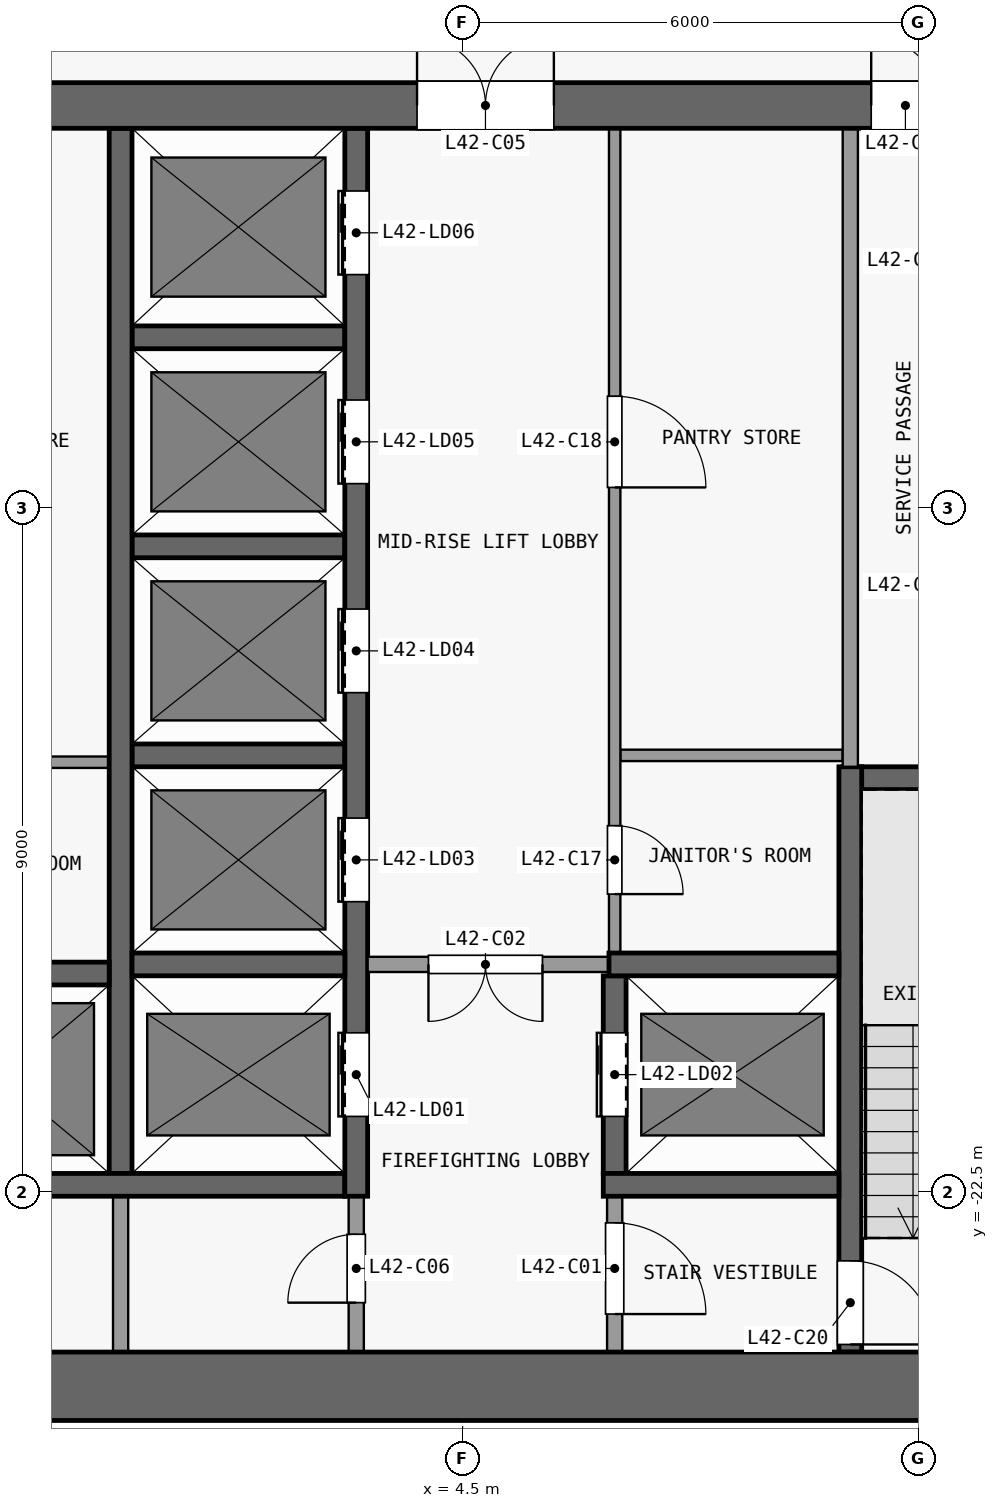
"""IFC4 building model, lengths in metres.
Left out: names, types, materials, properties, quantities, classifications, styles, units other than length and angle.
Written with IfcOpenShell. Run it as: python <this file> out.ifc"""

import sys

from ifc_helpers import new_model, si_unit, direction, frame, frame_2d, origin, place, context, subcontext, project, spatial, rectangle, extrude, element, fill, save


model = new_model("IFC4")
c1 = context("Model", 3, precision=1e-05, world=origin(), true_north=direction((0.0, 1.0)))
c2 = subcontext(c1, "Body", "Model", "MODEL_VIEW")
j1 = project(units=[si_unit("LENGTHUNIT", "METRE"), si_unit("PLANEANGLEUNIT", "RADIAN")], contexts=[c1])
p1 = place(None, origin())
s1 = spatial("IfcSite", under=j1, at=p1, CompositionType="ELEMENT")
p2 = place(p1, origin())
s2 = spatial("IfcBuilding", under=s1, at=p2, CompositionType="ELEMENT")
p3 = place(p2, frame((0.0, 0.0, 170.9)))
s3 = spatial("IfcBuildingStorey", under=s2, at=p3, CompositionType="ELEMENT", Elevation=170.9)
p4 = place(p3, frame((-13.3, -25.05, 0.0), z_axis=(0.0, 0.0, 1.0), x_axis=(1.0, 0.0, 0.0)))
e1 = element("IfcWall", 1, at=p4, inside=s3, PredefinedType="SHEAR", context=c2, shape_type="SweptSolid", body=[
    extrude(rectangle(XDim=26.6, YDim=0.9, at=frame_2d((13.3, 0.0))), origin(), (0.0, 0.0, 1.0), 3.3),
])
p5 = place(p3, frame((-13.3, -8.2, 0.0), z_axis=(0.0, 0.0, 1.0), x_axis=(1.0, 0.0, 0.0)))
e2 = element("IfcWall", 2, at=p5, inside=s3, PredefinedType="SHEAR", context=c2, shape_type="SweptSolid", body=[
    extrude(rectangle(XDim=26.6, YDim=0.6, at=frame_2d((13.3, 0.0))), origin(), (0.0, 0.0, 1.0), 3.3),
])
p6 = place(p5, frame((7.6, 0.0, 0.0)))
e3 = element("IfcOpeningElement", 3, at=p6, cuts=e2, PredefinedType="OPENING", context=c2, shape_type="SweptSolid", body=[
    extrude(rectangle(XDim=1.8, YDim=2.1, at=frame_2d((0.9, 1.05))), frame((0.0, 0.31, 0.0), z_axis=(0.0, -1.0, 0.0), x_axis=(1.0, 0.0, 0.0)), (0.0, 0.0, 1.0), 0.62),
])
p7 = place(p5, frame((17.2, 0.0, 0.0)))
e4 = element("IfcOpeningElement", 4, at=p7, cuts=e2, PredefinedType="OPENING", context=c2, shape_type="SweptSolid", body=[
    extrude(rectangle(XDim=1.8, YDim=2.1, at=frame_2d((0.9, 1.05))), frame((0.0, 0.31, 0.0), z_axis=(0.0, -1.0, 0.0), x_axis=(1.0, 0.0, 0.0)), (0.0, 0.0, 1.0), 0.62),
])
p8 = place(p5, frame((2.525, 0.0, 0.0)))
e5 = element("IfcOpeningElement", 5, at=p8, cuts=e2, PredefinedType="OPENING", context=c2, shape_type="SweptSolid", body=[
    extrude(rectangle(XDim=0.9, YDim=2.1, at=frame_2d((0.45, 1.05))), frame((0.0, 0.31, 0.0), z_axis=(0.0, -1.0, 0.0), x_axis=(1.0, 0.0, 0.0)), (0.0, 0.0, 1.0), 0.62),
])
p9 = place(p5, frame((23.175, 0.0, 0.0)))
e6 = element("IfcOpeningElement", 6, at=p9, cuts=e2, PredefinedType="OPENING", context=c2, shape_type="SweptSolid", body=[
    extrude(rectangle(XDim=0.9, YDim=2.1, at=frame_2d((0.45, 1.05))), frame((0.0, 0.31, 0.0), z_axis=(0.0, -1.0, 0.0), x_axis=(1.0, 0.0, 0.0)), (0.0, 0.0, 1.0), 0.62),
])
p10 = place(p3, frame((-3.25, -22.4, 0.0), z_axis=(0.0, 0.0, 1.0), x_axis=(1.0, 0.0, 0.0)))
e7 = element("IfcWall", 7, at=p10, inside=s3, PredefinedType="SHEAR", context=c2, shape_type="SweptSolid", body=[
    extrude(rectangle(XDim=6.2, YDim=0.3, at=frame_2d((3.1, 0.0))), origin(), (0.0, 0.0, 1.0), 3.3),
])
p11 = place(p3, frame((6.35, -22.4, 0.0), z_axis=(0.0, 0.0, 1.0), x_axis=(1.0, 0.0, 0.0)))
e8 = element("IfcWall", 8, at=p11, inside=s3, PredefinedType="SHEAR", context=c2, shape_type="SweptSolid", body=[
    extrude(rectangle(XDim=3.1, YDim=0.3, at=frame_2d((1.55, 0.0))), origin(), (0.0, 0.0, 1.0), 3.3),
])
p12 = place(p3, frame((-3.175, -19.62, 0.0), z_axis=(0.0, 0.0, 1.0), x_axis=(1.0, 0.0, 0.0)))
e9 = element("IfcWall", 9, at=p12, inside=s3, PredefinedType="SHEAR", context=c2, shape_type="SweptSolid", body=[
    extrude(rectangle(XDim=3.025, YDim=0.3, at=frame_2d((1.513, 0.0))), origin(), (0.0, 0.0, 1.0), 3.3),
])
p13 = place(p3, frame((0.15, -19.5, 0.0), z_axis=(0.0, 0.0, 1.0), x_axis=(1.0, 0.0, 0.0)))
e10 = element("IfcWall", 10, at=p13, inside=s3, PredefinedType="SHEAR", context=c2, shape_type="SweptSolid", body=[
    extrude(rectangle(XDim=2.8, YDim=0.3, at=frame_2d((1.4, 0.0))), origin(), (0.0, 0.0, 1.0), 3.3),
])
p14 = place(p3, frame((6.575, -19.5, 0.0), z_axis=(0.0, 0.0, 1.0), x_axis=(-1.0, 0.0, 0.0)))
e11 = element("IfcWall", 11, at=p14, inside=s3, PredefinedType="PARTITIONING", context=c2, shape_type="SweptSolid", body=[
    extrude(rectangle(XDim=3.325, YDim=0.2, at=frame_2d((1.663, 0.0))), origin(), (0.0, 0.0, 1.0), 3.3),
])
p15 = place(p14, frame((1.025, 0.0, 0.0)))
e12 = element("IfcOpeningElement", 12, at=p15, cuts=e11, PredefinedType="OPENING", context=c2, shape_type="SweptSolid", body=[
    extrude(rectangle(XDim=1.5, YDim=2.1, at=frame_2d((0.75, 1.05))), frame((0.0, 0.11, 0.0), z_axis=(0.0, -1.0, 0.0), x_axis=(1.0, 0.0, 0.0)), (0.0, 0.0, 1.0), 0.22),
])
p16 = place(p3, frame((6.425, -19.5, 0.0), z_axis=(0.0, 0.0, 1.0), x_axis=(1.0, 0.0, 0.0)))
e13 = element("IfcWall", 13, at=p16, inside=s3, PredefinedType="SHEAR", context=c2, shape_type="SweptSolid", body=[
    extrude(rectangle(XDim=3.025, YDim=0.3, at=frame_2d((1.512, 0.0))), origin(), (0.0, 0.0, 1.0), 3.3),
])
p17 = place(p3, frame((9.5, -17.05, 0.0), z_axis=(0.0, 0.0, 1.0), x_axis=(1.0, 0.0, 0.0)))
e14 = element("IfcWall", 14, at=p17, inside=s3, PredefinedType="SHEAR", context=c2, shape_type="SweptSolid", body=[
    extrude(rectangle(XDim=3.1, YDim=0.3, at=frame_2d((1.55, 0.0))), origin(), (0.0, 0.0, 1.0), 3.3),
])
p18 = place(p3, frame((-3.025, -16.84, 0.0), z_axis=(0.0, 0.0, 1.0), x_axis=(1.0, 0.0, 0.0)))
e15 = element("IfcWall", 15, at=p18, inside=s3, PredefinedType="PARTITIONING", context=c2, shape_type="SweptSolid", body=[
    extrude(rectangle(XDim=2.875, YDim=0.15, at=frame_2d((1.438, 0.0))), origin(), (0.0, 0.0, 1.0), 3.3),
])
p19 = place(p3, frame((0.15, -16.75, 0.0), z_axis=(0.0, 0.0, 1.0), x_axis=(1.0, 0.0, 0.0)))
e16 = element("IfcWall", 16, at=p19, inside=s3, PredefinedType="SHEAR", context=c2, shape_type="SweptSolid", body=[
    extrude(rectangle(XDim=2.8, YDim=0.3, at=frame_2d((1.4, 0.0))), origin(), (0.0, 0.0, 1.0), 3.3),
])
p20 = place(p3, frame((6.575, -16.75, 0.0), z_axis=(0.0, 0.0, 1.0), x_axis=(1.0, 0.0, 0.0)))
e17 = element("IfcWall", 17, at=p20, inside=s3, PredefinedType="PARTITIONING", context=c2, shape_type="SweptSolid", body=[
    extrude(rectangle(XDim=2.925, YDim=0.15, at=frame_2d((1.462, 0.0))), origin(), (0.0, 0.0, 1.0), 3.3),
])
for number, where, z_axis, x_axis in (
    (18, (0.15, -14.0, 0.0), (0.0, 0.0, 1.0), (1.0, 0.0, 0.0)),
    (19, (0.15, -11.25, 0.0), (0.0, 0.0, 1.0), (1.0, 0.0, 0.0)),
):
    element("IfcWall", number, at=place(p3, frame(where, z_axis=z_axis, x_axis=x_axis)), inside=s3, PredefinedType="SHEAR", context=c2, shape_type="SweptSolid", body=[
        extrude(rectangle(XDim=2.8, YDim=0.3, at=frame_2d((1.4, 0.0))), origin(), (0.0, 0.0, 1.0), 3.3),
    ])
p21 = place(p3, frame((0.0, -24.6, 0.0), z_axis=(0.0, 0.0, 1.0), x_axis=(0.0, 1.0, 0.0)))
e20 = element("IfcWall", 20, at=p21, inside=s3, PredefinedType="PARTITIONING", context=c2, shape_type="SweptSolid", body=[
    extrude(rectangle(XDim=2.05, YDim=0.2, at=frame_2d((1.025, 0.0))), origin(), (0.0, 0.0, 1.0), 3.3),
])
p22 = place(p3, frame((0.0, -22.25, 0.0), z_axis=(0.0, 0.0, 1.0), x_axis=(0.0, 1.0, 0.0)))
e21 = element("IfcWall", 21, at=p22, inside=s3, PredefinedType="SHEAR", context=c2, shape_type="SweptSolid", body=[
    extrude(rectangle(XDim=13.75, YDim=0.3, at=frame_2d((6.875, 0.0))), origin(), (0.0, 0.0, 1.0), 3.3),
])
p23 = place(p3, frame((3.1, -24.6, 0.0), z_axis=(0.0, 0.0, 1.0), x_axis=(0.0, 1.0, 0.0)))
e22 = element("IfcWall", 22, at=p23, inside=s3, PredefinedType="PARTITIONING", context=c2, shape_type="SweptSolid", body=[
    extrude(rectangle(XDim=2.05, YDim=0.2, at=frame_2d((1.025, 0.0))), origin(), (0.0, 0.0, 1.0), 3.3),
])
p24 = place(p23, frame((0.65, 0.0, 0.0)))
e23 = element("IfcOpeningElement", 23, at=p24, cuts=e22, PredefinedType="OPENING", context=c2, shape_type="SweptSolid", body=[
    extrude(rectangle(XDim=0.9, YDim=2.1, at=frame_2d((0.45, 1.05))), frame((0.0, 0.11, 0.0), z_axis=(0.0, -1.0, 0.0), x_axis=(1.0, 0.0, 0.0)), (0.0, 0.0, 1.0), 0.22),
])
p25 = place(p3, frame((3.1, -22.55, 0.0), z_axis=(0.0, 0.0, 1.0), x_axis=(0.0, 1.0, 0.0)))
e24 = element("IfcWall", 24, at=p25, inside=s3, PredefinedType="SHEAR", context=c2, shape_type="SweptSolid", body=[
    extrude(rectangle(XDim=14.05, YDim=0.3, at=frame_2d((7.025, 0.0))), origin(), (0.0, 0.0, 1.0), 3.3),
])
p26 = place(p25, frame((1.05, 0.0, 0.0)))
e25 = element("IfcOpeningElement", 25, at=p26, cuts=e24, PredefinedType="OPENING", context=c2, shape_type="SweptSolid", body=[
    extrude(rectangle(XDim=1.1, YDim=2.1, at=frame_2d((0.55, 1.05))), frame((0.0, 0.16, 0.0), z_axis=(0.0, -1.0, 0.0), x_axis=(1.0, 0.0, 0.0)), (0.0, 0.0, 1.0), 0.32),
])
p27 = place(p25, frame((3.875, 0.0, 0.0)))
e26 = element("IfcOpeningElement", 26, at=p27, cuts=e24, PredefinedType="OPENING", context=c2, shape_type="SweptSolid", body=[
    extrude(rectangle(XDim=1.1, YDim=2.1, at=frame_2d((0.55, 1.05))), frame((0.0, 0.16, 0.0), z_axis=(0.0, -1.0, 0.0), x_axis=(1.0, 0.0, 0.0)), (0.0, 0.0, 1.0), 0.32),
])
p28 = place(p25, frame((6.625, 0.0, 0.0)))
e27 = element("IfcOpeningElement", 27, at=p28, cuts=e24, PredefinedType="OPENING", context=c2, shape_type="SweptSolid", body=[
    extrude(rectangle(XDim=1.1, YDim=2.1, at=frame_2d((0.55, 1.05))), frame((0.0, 0.16, 0.0), z_axis=(0.0, -1.0, 0.0), x_axis=(1.0, 0.0, 0.0)), (0.0, 0.0, 1.0), 0.32),
])
p29 = place(p25, frame((9.375, 0.0, 0.0)))
e28 = element("IfcOpeningElement", 28, at=p29, cuts=e24, PredefinedType="OPENING", context=c2, shape_type="SweptSolid", body=[
    extrude(rectangle(XDim=1.1, YDim=2.1, at=frame_2d((0.55, 1.05))), frame((0.0, 0.16, 0.0), z_axis=(0.0, -1.0, 0.0), x_axis=(1.0, 0.0, 0.0)), (0.0, 0.0, 1.0), 0.32),
])
p30 = place(p25, frame((12.125, 0.0, 0.0)))
e29 = element("IfcOpeningElement", 29, at=p30, cuts=e24, PredefinedType="OPENING", context=c2, shape_type="SweptSolid", body=[
    extrude(rectangle(XDim=1.1, YDim=2.1, at=frame_2d((0.55, 1.05))), frame((0.0, 0.16, 0.0), z_axis=(0.0, -1.0, 0.0), x_axis=(1.0, 0.0, 0.0)), (0.0, 0.0, 1.0), 0.32),
])
p31 = place(p3, frame((6.5, -22.55, 0.0), z_axis=(0.0, 0.0, 1.0), x_axis=(0.0, -1.0, 0.0)))
e30 = element("IfcWall", 30, at=p31, inside=s3, PredefinedType="PARTITIONING", context=c2, shape_type="SweptSolid", body=[
    extrude(rectangle(XDim=2.05, YDim=0.2, at=frame_2d((1.025, 0.0))), origin(), (0.0, 0.0, 1.0), 3.3),
])
p32 = place(p31, frame((0.35, 0.0, 0.0)))
e31 = element("IfcOpeningElement", 31, at=p32, cuts=e30, PredefinedType="OPENING", context=c2, shape_type="SweptSolid", body=[
    extrude(rectangle(XDim=1.2, YDim=2.1, at=frame_2d((0.6, 1.05))), frame((0.0, 0.11, 0.0), z_axis=(0.0, -1.0, 0.0), x_axis=(1.0, 0.0, 0.0)), (0.0, 0.0, 1.0), 0.22),
])
p33 = place(p3, frame((6.5, -22.25, 0.0), z_axis=(0.0, 0.0, 1.0), x_axis=(0.0, 1.0, 0.0)))
e32 = element("IfcWall", 32, at=p33, inside=s3, PredefinedType="SHEAR", context=c2, shape_type="SweptSolid", body=[
    extrude(rectangle(XDim=2.6, YDim=0.3, at=frame_2d((1.3, 0.0))), origin(), (0.0, 0.0, 1.0), 3.3),
])
p34 = place(p33, frame((0.75, 0.0, 0.0)))
e33 = element("IfcOpeningElement", 33, at=p34, cuts=e32, PredefinedType="OPENING", context=c2, shape_type="SweptSolid", body=[
    extrude(rectangle(XDim=1.1, YDim=2.1, at=frame_2d((0.55, 1.05))), frame((0.0, 0.16, 0.0), z_axis=(0.0, -1.0, 0.0), x_axis=(1.0, 0.0, 0.0)), (0.0, 0.0, 1.0), 0.32),
])
p35 = place(p3, frame((6.5, -8.5, 0.0), z_axis=(0.0, 0.0, 1.0), x_axis=(0.0, -1.0, 0.0)))
e34 = element("IfcWall", 34, at=p35, inside=s3, PredefinedType="PARTITIONING", context=c2, shape_type="SweptSolid", body=[
    extrude(rectangle(XDim=10.85, YDim=0.15, at=frame_2d((5.425, 0.0))), origin(), (0.0, 0.0, 1.0), 3.3),
])
p36 = place(p35, frame((9.175, 0.0, 0.0)))
e35 = element("IfcOpeningElement", 35, at=p36, cuts=e34, PredefinedType="OPENING", context=c2, shape_type="SweptSolid", body=[
    extrude(rectangle(XDim=0.9, YDim=2.1, at=frame_2d((0.45, 1.05))), frame((0.0, 0.085, 0.0), z_axis=(0.0, -1.0, 0.0), x_axis=(1.0, 0.0, 0.0)), (0.0, 0.0, 1.0), 0.17),
])
p37 = place(p35, frame((3.525, 0.0, 0.0)))
e36 = element("IfcOpeningElement", 36, at=p37, cuts=e34, PredefinedType="OPENING", context=c2, shape_type="SweptSolid", body=[
    extrude(rectangle(XDim=1.2, YDim=2.1, at=frame_2d((0.6, 1.05))), frame((0.0, 0.085, 0.0), z_axis=(0.0, -1.0, 0.0), x_axis=(1.0, 0.0, 0.0)), (0.0, 0.0, 1.0), 0.17),
])
p38 = place(p3, frame((9.6, -16.9, 0.0), z_axis=(0.0, 0.0, 1.0), x_axis=(0.0, -1.0, 0.0)))
e37 = element("IfcWall", 37, at=p38, inside=s3, PredefinedType="SHEAR", context=c2, shape_type="SweptSolid", body=[
    extrude(rectangle(XDim=7.7, YDim=0.3, at=frame_2d((3.85, 0.0))), origin(), (0.0, 0.0, 1.0), 3.3),
])
p39 = place(p38, frame((6.5, 0.0, 0.0)))
e38 = element("IfcOpeningElement", 38, at=p39, cuts=e37, PredefinedType="OPENING", context=c2, shape_type="SweptSolid", body=[
    extrude(rectangle(XDim=1.1, YDim=2.1, at=frame_2d((0.55, 1.05))), frame((0.0, 0.16, 0.0), z_axis=(0.0, -1.0, 0.0), x_axis=(1.0, 0.0, 0.0)), (0.0, 0.0, 1.0), 0.32),
])
p40 = place(p3, frame((9.6, -16.9, 0.0), z_axis=(0.0, 0.0, 1.0), x_axis=(0.0, 1.0, 0.0)))
e39 = element("IfcWall", 39, at=p40, inside=s3, PredefinedType="PARTITIONING", context=c2, shape_type="SweptSolid", body=[
    extrude(rectangle(XDim=8.4, YDim=0.2, at=frame_2d((4.2, 0.0))), origin(), (0.0, 0.0, 1.0), 3.3),
])
p41 = place(p26, origin())
e40 = element("IfcDoor", 40, at=p41, inside=s3, OperationType="DOUBLE_DOOR_SLIDING", PredefinedType="DOOR", context=c2, shape_type="SweptSolid", body=[
    extrude(rectangle(XDim=1.1, YDim=2.1, at=frame_2d((0.55, 1.05))), frame((0.0, 0.025, 0.0), z_axis=(0.0, -1.0, 0.0), x_axis=(1.0, 0.0, 0.0)), (0.0, 0.0, 1.0), 0.05),
])
fill(e25, e40)
p42 = place(p34, origin())
e41 = element("IfcDoor", 41, at=p42, inside=s3, OperationType="DOUBLE_DOOR_SLIDING", PredefinedType="DOOR", context=c2, shape_type="SweptSolid", body=[
    extrude(rectangle(XDim=1.1, YDim=2.1, at=frame_2d((0.55, 1.05))), frame((0.0, 0.025, 0.0), z_axis=(0.0, -1.0, 0.0), x_axis=(1.0, 0.0, 0.0)), (0.0, 0.0, 1.0), 0.05),
])
fill(e33, e41)
p43 = place(p27, origin())
e42 = element("IfcDoor", 42, at=p43, inside=s3, OperationType="DOUBLE_DOOR_SLIDING", PredefinedType="DOOR", context=c2, shape_type="SweptSolid", body=[
    extrude(rectangle(XDim=1.1, YDim=2.1, at=frame_2d((0.55, 1.05))), frame((0.0, 0.025, 0.0), z_axis=(0.0, -1.0, 0.0), x_axis=(1.0, 0.0, 0.0)), (0.0, 0.0, 1.0), 0.05),
])
fill(e26, e42)
p44 = place(p28, origin())
e43 = element("IfcDoor", 43, at=p44, inside=s3, OperationType="DOUBLE_DOOR_SLIDING", PredefinedType="DOOR", context=c2, shape_type="SweptSolid", body=[
    extrude(rectangle(XDim=1.1, YDim=2.1, at=frame_2d((0.55, 1.05))), frame((0.0, 0.025, 0.0), z_axis=(0.0, -1.0, 0.0), x_axis=(1.0, 0.0, 0.0)), (0.0, 0.0, 1.0), 0.05),
])
fill(e27, e43)
p45 = place(p29, origin())
e44 = element("IfcDoor", 44, at=p45, inside=s3, OperationType="DOUBLE_DOOR_SLIDING", PredefinedType="DOOR", context=c2, shape_type="SweptSolid", body=[
    extrude(rectangle(XDim=1.1, YDim=2.1, at=frame_2d((0.55, 1.05))), frame((0.0, 0.025, 0.0), z_axis=(0.0, -1.0, 0.0), x_axis=(1.0, 0.0, 0.0)), (0.0, 0.0, 1.0), 0.05),
])
fill(e28, e44)
p46 = place(p30, origin())
e45 = element("IfcDoor", 45, at=p46, inside=s3, OperationType="DOUBLE_DOOR_SLIDING", PredefinedType="DOOR", context=c2, shape_type="SweptSolid", body=[
    extrude(rectangle(XDim=1.1, YDim=2.1, at=frame_2d((0.55, 1.05))), frame((0.0, 0.025, 0.0), z_axis=(0.0, -1.0, 0.0), x_axis=(1.0, 0.0, 0.0)), (0.0, 0.0, 1.0), 0.05),
])
fill(e29, e45)
p47 = place(p32, origin())
e46 = element("IfcDoor", 46, at=p47, inside=s3, OperationType="SINGLE_SWING_RIGHT", PredefinedType="DOOR", context=c2, shape_type="SweptSolid", body=[
    extrude(rectangle(XDim=1.2, YDim=2.1, at=frame_2d((0.6, 1.05))), frame((0.0, 0.025, 0.0), z_axis=(0.0, -1.0, 0.0), x_axis=(1.0, 0.0, 0.0)), (0.0, 0.0, 1.0), 0.05),
])
fill(e31, e46)
p48 = place(p15, origin())
e47 = element("IfcDoor", 47, at=p48, inside=s3, OperationType="DOUBLE_DOOR_SINGLE_SWING", PredefinedType="DOOR", context=c2, shape_type="SweptSolid", body=[
    extrude(rectangle(XDim=1.5, YDim=2.1, at=frame_2d((0.75, 1.05))), frame((0.0, 0.025, 0.0), z_axis=(0.0, -1.0, 0.0), x_axis=(1.0, 0.0, 0.0)), (0.0, 0.0, 1.0), 0.05),
])
fill(e12, e47)
p49 = place(p7, origin())
e48 = element("IfcDoor", 48, at=p49, inside=s3, OperationType="DOUBLE_DOOR_SINGLE_SWING", PredefinedType="DOOR", context=c2, shape_type="SweptSolid", body=[
    extrude(rectangle(XDim=1.8, YDim=2.1, at=frame_2d((0.9, 1.05))), frame((0.0, 0.025, 0.0), z_axis=(0.0, -1.0, 0.0), x_axis=(1.0, 0.0, 0.0)), (0.0, 0.0, 1.0), 0.05),
])
fill(e4, e48)
p50 = place(p24, origin())
e49 = element("IfcDoor", 49, at=p50, inside=s3, OperationType="SINGLE_SWING_LEFT", PredefinedType="DOOR", context=c2, shape_type="SweptSolid", body=[
    extrude(rectangle(XDim=0.9, YDim=2.1, at=frame_2d((0.45, 1.05))), frame((0.0, 0.025, 0.0), z_axis=(0.0, -1.0, 0.0), x_axis=(1.0, 0.0, 0.0)), (0.0, 0.0, 1.0), 0.05),
])
fill(e23, e49)
p51 = place(p9, origin())
e50 = element("IfcDoor", 50, at=p51, inside=s3, OperationType="SINGLE_SWING_LEFT", PredefinedType="DOOR", context=c2, shape_type="SweptSolid", body=[
    extrude(rectangle(XDim=0.9, YDim=2.1, at=frame_2d((0.45, 1.05))), frame((0.0, 0.025, 0.0), z_axis=(0.0, -1.0, 0.0), x_axis=(1.0, 0.0, 0.0)), (0.0, 0.0, 1.0), 0.05),
])
fill(e6, e50)
p52 = place(p36, origin())
e51 = element("IfcDoor", 51, at=p52, inside=s3, OperationType="SINGLE_SWING_RIGHT", PredefinedType="DOOR", context=c2, shape_type="SweptSolid", body=[
    extrude(rectangle(XDim=0.9, YDim=2.1, at=frame_2d((0.45, 1.05))), frame((0.0, 0.025, 0.0), z_axis=(0.0, -1.0, 0.0), x_axis=(1.0, 0.0, 0.0)), (0.0, 0.0, 1.0), 0.05),
])
fill(e35, e51)
p53 = place(p37, origin())
e52 = element("IfcDoor", 52, at=p53, inside=s3, OperationType="SINGLE_SWING_RIGHT", PredefinedType="DOOR", context=c2, shape_type="SweptSolid", body=[
    extrude(rectangle(XDim=1.2, YDim=2.1, at=frame_2d((0.6, 1.05))), frame((0.0, 0.025, 0.0), z_axis=(0.0, -1.0, 0.0), x_axis=(1.0, 0.0, 0.0)), (0.0, 0.0, 1.0), 0.05),
])
fill(e36, e52)
p54 = place(p39, origin())
e53 = element("IfcDoor", 53, at=p54, inside=s3, OperationType="SINGLE_SWING_RIGHT", PredefinedType="DOOR", context=c2, shape_type="SweptSolid", body=[
    extrude(rectangle(XDim=1.1, YDim=2.1, at=frame_2d((0.55, 1.05))), frame((0.0, 0.025, 0.0), z_axis=(0.0, -1.0, 0.0), x_axis=(1.0, 0.0, 0.0)), (0.0, 0.0, 1.0), 0.05),
])
fill(e38, e53)
save(model, sys.argv[1])
